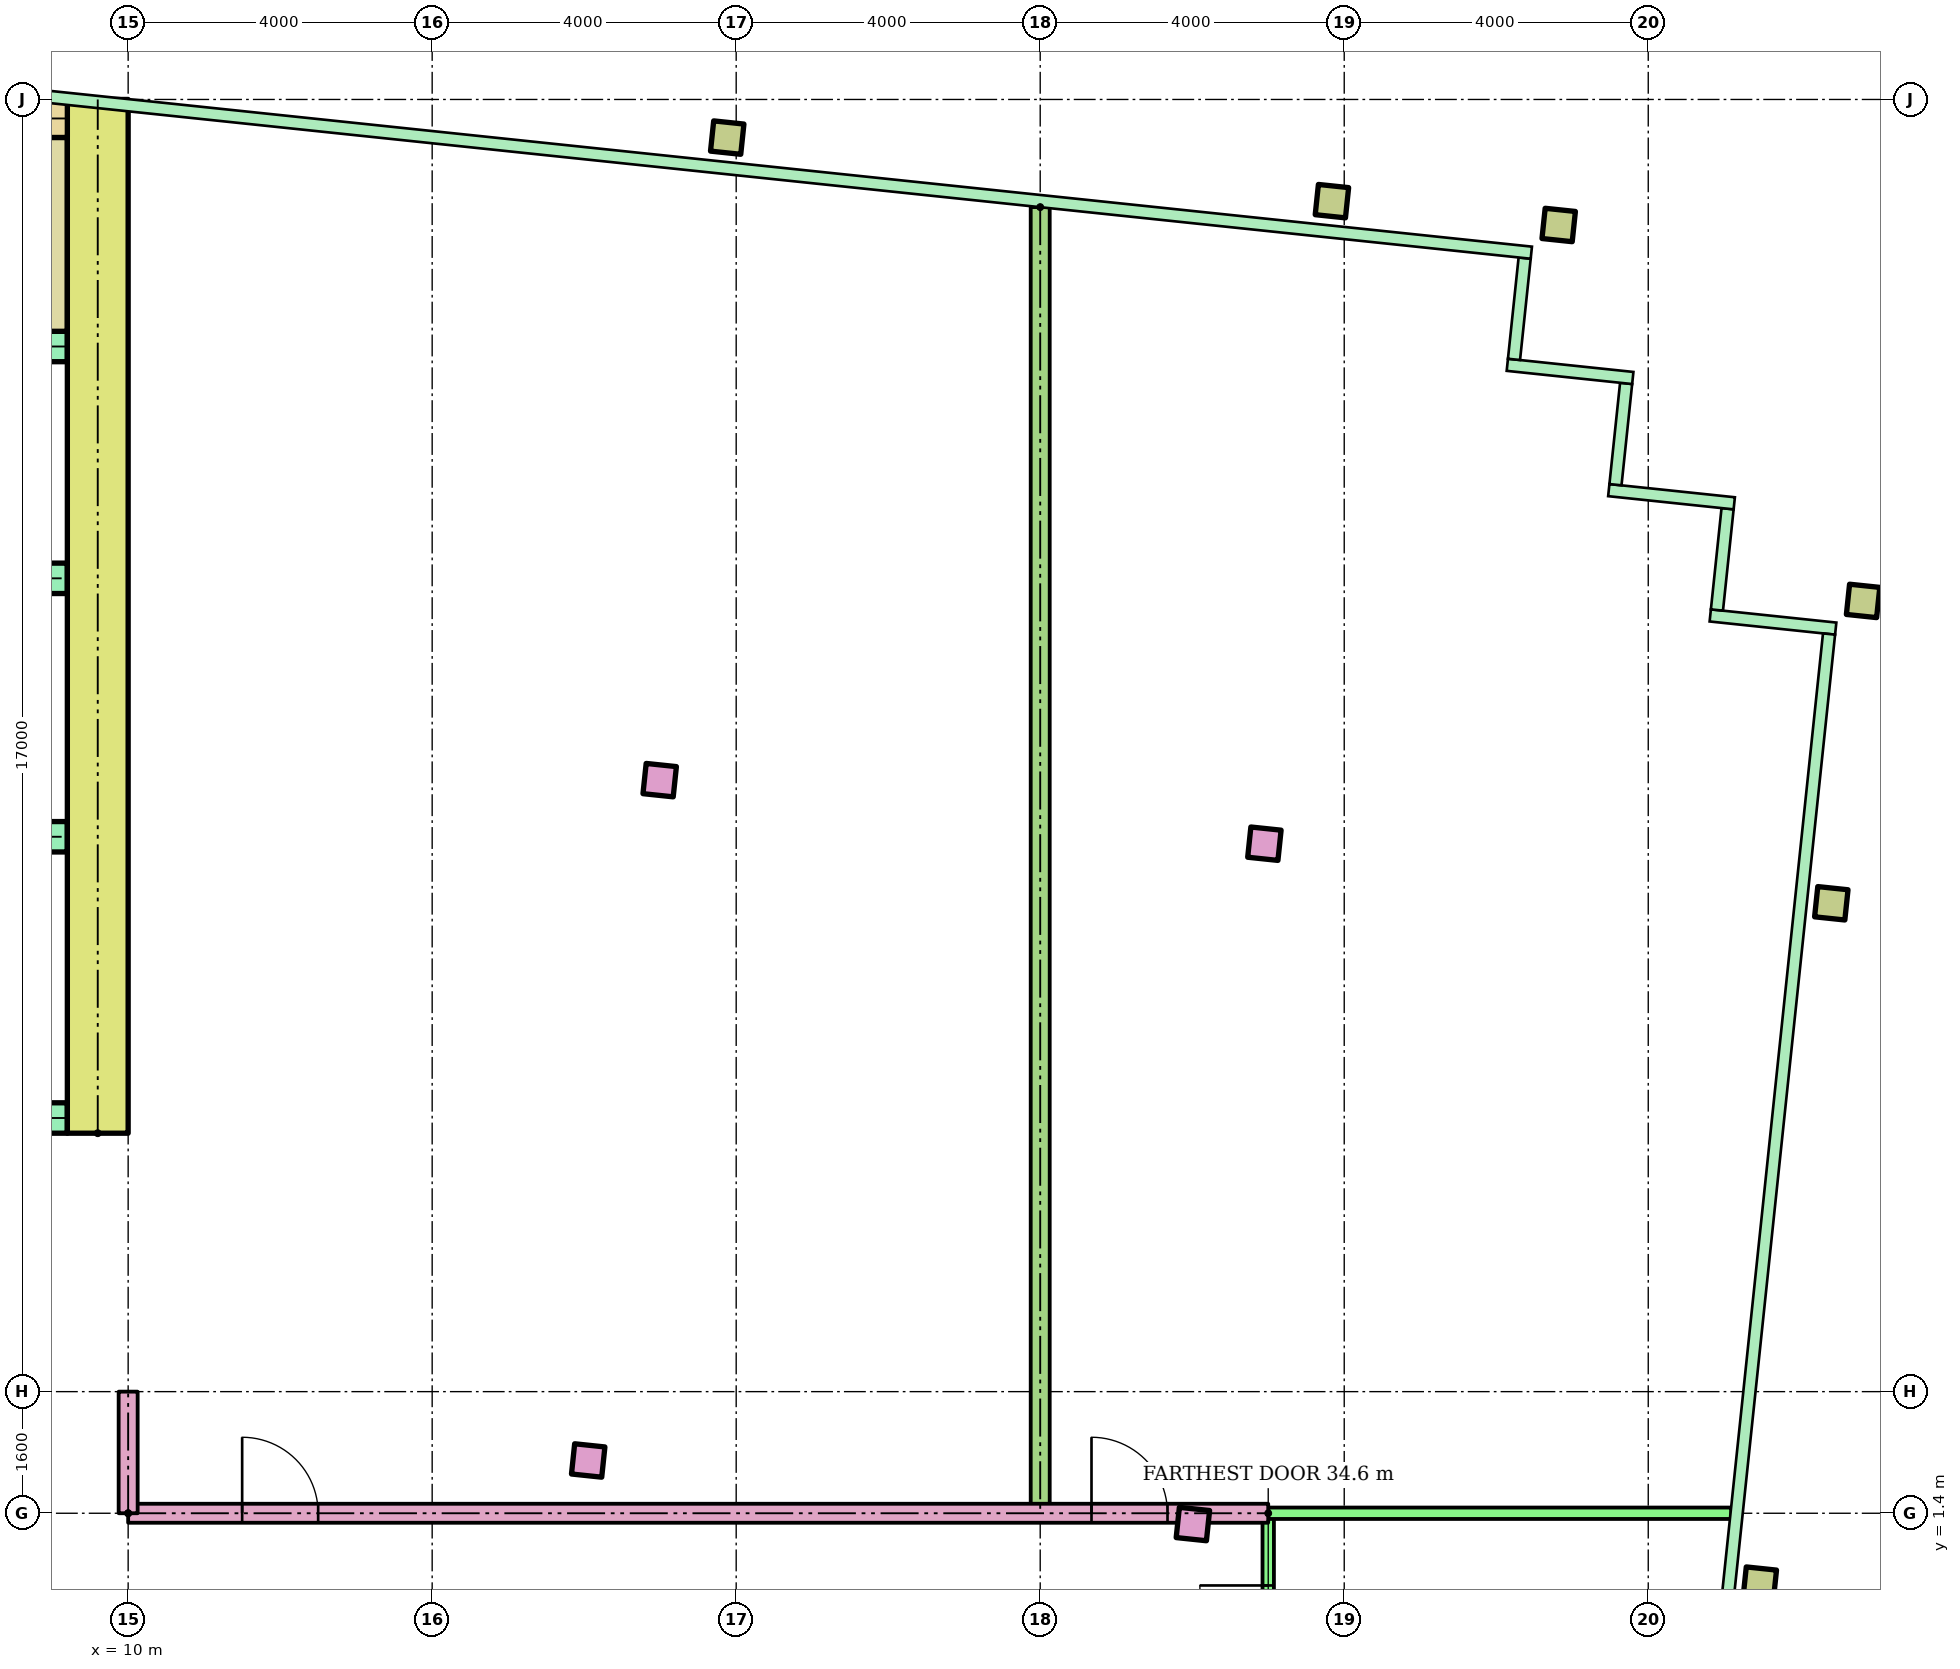
"""IFC4 building model, lengths in metres.
Left out: names, types, materials, properties, quantities, classifications, styles, units other than length and angle.
Written with IfcOpenShell. Run it as: python <this file> out.ifc"""

import sys

from ifc_helpers import new_model, si_unit, direction, frame, frame_2d, origin, origin_2d, place, context, subcontext, project, spatial, rectangle, hollow_rectangle, extrude, element, fill, save


model = new_model("IFC4")
c1 = context("Model", 3, precision=1e-05, world=origin(), true_north=direction((0.0, 1.0)))
c2 = subcontext(c1, "Body", "Model", "MODEL_VIEW")
j1 = project(units=[si_unit("LENGTHUNIT", "METRE"), si_unit("PLANEANGLEUNIT", "RADIAN")], contexts=[c1])
p1 = place(None, origin())
s1 = spatial("IfcSite", under=j1, at=p1, CompositionType="ELEMENT")
p2 = place(p1, origin())
s2 = spatial("IfcBuilding", under=s1, at=p2, CompositionType="ELEMENT")
p3 = place(p2, frame((0.0, 0.0, 291.5)))
s3 = spatial("IfcBuildingStorey", under=s2, at=p3, CompositionType="ELEMENT", Elevation=291.5)
for number, where, z_axis, x_axis in (
    (1, (16.053, 2.094, 0.0), (0.0, 0.0, 1.0), (0.995, -0.105, 0.0)),
    (2, (24.009, 1.258, 0.0), (0.0, 0.0, 1.0), (0.995, -0.105, 0.0)),
):
    element("IfcColumn", number, at=place(p3, frame(where, z_axis=z_axis, x_axis=x_axis)), inside=s3, PredefinedType="COLUMN", context=c2, shape_type="SweptSolid", body=[
        extrude(rectangle(XDim=0.4, YDim=0.4, at=origin_2d()), origin(), (0.0, 0.0, 1.0), 3.4),
    ])
p4 = place(p3, frame((31.468, 0.474, 0.0), z_axis=(0.0, 0.0, 1.0), x_axis=(0.994521895368, -0.104528463268, 0.0)))
e3 = element("IfcColumn", 3, at=p4, inside=s3, PredefinedType="COLUMN", context=c2, shape_type="SweptSolid", body=[
    extrude(hollow_rectangle(XDim=0.4, YDim=0.4, WallThickness=0.02, at=origin_2d()), origin(), (0.0, 0.0, 1.0), 3.4),
])
for number, where, z_axis, x_axis in (
    (4, (16.993, 11.045, 0.0), (0.0, 0.0, 1.0), (0.995, -0.105, 0.0)),
    (5, (24.95, 10.209, 0.0), (0.0, 0.0, 1.0), (0.995, -0.105, 0.0)),
):
    element("IfcColumn", number, at=place(p3, frame(where, z_axis=z_axis, x_axis=x_axis)), inside=s3, PredefinedType="COLUMN", context=c2, shape_type="SweptSolid", body=[
        extrude(rectangle(XDim=0.4, YDim=0.4, at=origin_2d()), origin(), (0.0, 0.0, 1.0), 3.4),
    ])
for number, where, z_axis, x_axis in (
    (6, (32.409, 9.425, 0.0), (0.0, 0.0, 1.0), (0.995, -0.105, 0.0)),
    (7, (32.827, 13.403, 0.0), (0.0, 0.0, 1.0), (0.995, -0.105, 0.0)),
    (8, (17.882, 19.498, 0.0), (0.0, 0.0, 1.0), (0.995, -0.105, 0.0)),
    (9, (25.838, 18.662, 0.0), (0.0, 0.0, 1.0), (0.995, -0.105, 0.0)),
    (10, (28.822, 18.349, 0.0), (0.0, 0.0, 1.0), (0.995, -0.105, 0.0)),
):
    element("IfcColumn", number, at=place(p3, frame(where, z_axis=z_axis, x_axis=x_axis)), inside=s3, PredefinedType="COLUMN", context=c2, shape_type="SweptSolid", body=[
        extrude(hollow_rectangle(XDim=0.4, YDim=0.4, WallThickness=0.02, at=origin_2d()), origin(), (0.0, 0.0, 1.0), 3.4),
    ])
p5 = place(p3, frame((9.6, 6.4, 0.0), z_axis=(0.0, 0.0, 1.0), x_axis=(0.0, 1.0, 0.0)))
e11 = element("IfcWall", 11, at=p5, inside=s3, PredefinedType="SHEAR", context=c2, shape_type="SweptSolid", body=[
    extrude(rectangle(XDim=13.6, YDim=0.8, at=frame_2d((6.8, 0.0))), origin(), (0.0, 0.0, 1.0), 3.12),
])
p6 = place(p3, frame((-9.2, 19.75, 0.0)))
e12 = element("IfcWall", 12, at=p6, inside=s3, PredefinedType="SHEAR", context=c2, shape_type="SweptSolid", body=[
    extrude(rectangle(XDim=18.4, YDim=0.5, at=frame_2d((9.2, 0.0))), origin(), (0.0, 0.0, 1.0), 3.12),
])
p7 = place(p3, frame((-9.2, 6.6, 0.0)))
e13 = element("IfcWall", 13, at=p7, inside=s3, PredefinedType="SHEAR", context=c2, shape_type="SweptSolid", body=[
    extrude(rectangle(XDim=18.4, YDim=0.4, at=frame_2d((9.2, 0.0))), origin(), (0.0, 0.0, 1.0), 3.12),
])
p8 = place(p7, frame((8.3, 0.0, 0.0)))
e14 = element("IfcOpeningElement", 14, at=p8, cuts=e13, PredefinedType="OPENING", context=c2, shape_type="SweptSolid", body=[
    extrude(rectangle(XDim=1.8, YDim=2.1, at=frame_2d((0.9, 1.05))), frame((0.0, 0.21, 0.0), z_axis=(0.0, -1.0, 0.0), x_axis=(1.0, 0.0, 0.0)), (0.0, 0.0, 1.0), 0.42),
])
p9 = place(p7, frame((3.8, 0.0, 0.0)))
e15 = element("IfcOpeningElement", 15, at=p9, cuts=e13, PredefinedType="OPENING", context=c2, shape_type="SweptSolid", body=[
    extrude(rectangle(XDim=1.8, YDim=2.1, at=frame_2d((0.9, 1.05))), frame((0.0, 0.21, 0.0), z_axis=(0.0, -1.0, 0.0), x_axis=(1.0, 0.0, 0.0)), (0.0, 0.0, 1.0), 0.42),
])
p10 = place(p7, frame((12.8, 0.0, 0.0)))
e16 = element("IfcOpeningElement", 16, at=p10, cuts=e13, PredefinedType="OPENING", context=c2, shape_type="SweptSolid", body=[
    extrude(rectangle(XDim=1.8, YDim=2.1, at=frame_2d((0.9, 1.05))), frame((0.0, 0.21, 0.0), z_axis=(0.0, -1.0, 0.0), x_axis=(1.0, 0.0, 0.0)), (0.0, 0.0, 1.0), 0.42),
])
p11 = place(p3, frame((1.2, 10.3, 0.0)))
e17 = element("IfcWall", 17, at=p11, inside=s3, PredefinedType="SHEAR", context=c2, shape_type="SweptSolid", body=[
    extrude(rectangle(XDim=8.0, YDim=0.4, at=frame_2d((4.0, 0.0))), origin(), (0.0, 0.0, 1.0), 3.12),
])
p12 = place(p11, frame((0.817, 0.0, 0.0)))
e18 = element("IfcOpeningElement", 18, at=p12, cuts=e17, PredefinedType="OPENING", context=c2, shape_type="SweptSolid", body=[
    extrude(rectangle(XDim=1.1, YDim=2.1, at=frame_2d((0.55, 1.05))), frame((0.0, 0.21, 0.0), z_axis=(0.0, -1.0, 0.0), x_axis=(1.0, 0.0, 0.0)), (0.0, 0.0, 1.0), 0.42),
])
p13 = place(p11, frame((3.55, 0.0, 0.0)))
e19 = element("IfcOpeningElement", 19, at=p13, cuts=e17, PredefinedType="OPENING", context=c2, shape_type="SweptSolid", body=[
    extrude(rectangle(XDim=1.1, YDim=2.1, at=frame_2d((0.55, 1.05))), frame((0.0, 0.21, 0.0), z_axis=(0.0, -1.0, 0.0), x_axis=(1.0, 0.0, 0.0)), (0.0, 0.0, 1.0), 0.42),
])
p14 = place(p11, frame((6.283, 0.0, 0.0)))
e20 = element("IfcOpeningElement", 20, at=p14, cuts=e17, PredefinedType="OPENING", context=c2, shape_type="SweptSolid", body=[
    extrude(rectangle(XDim=1.1, YDim=2.1, at=frame_2d((0.55, 1.05))), frame((0.0, 0.21, 0.0), z_axis=(0.0, -1.0, 0.0), x_axis=(1.0, 0.0, 0.0)), (0.0, 0.0, 1.0), 0.42),
])
p15 = place(p3, frame((1.2, 13.7, 0.0)))
e21 = element("IfcWall", 21, at=p15, inside=s3, PredefinedType="SHEAR", context=c2, shape_type="SweptSolid", body=[
    extrude(rectangle(XDim=8.0, YDim=0.4, at=frame_2d((4.0, 0.0))), origin(), (0.0, 0.0, 1.0), 3.12),
])
p16 = place(p3, frame((-9.2, 16.75, 0.0)))
e22 = element("IfcWall", 22, at=p16, inside=s3, PredefinedType="SHEAR", context=c2, shape_type="SweptSolid", body=[
    extrude(rectangle(XDim=18.4, YDim=0.4, at=frame_2d((9.2, 0.0))), origin(), (0.0, 0.0, 1.0), 3.12),
])
p17 = place(p16, frame((0.1, 0.0, 0.0)))
e23 = element("IfcOpeningElement", 23, at=p17, cuts=e22, PredefinedType="OPENING", context=c2, shape_type="SweptSolid", body=[
    extrude(rectangle(XDim=0.95, YDim=2.1, at=frame_2d((0.475, 1.05))), frame((0.0, 0.21, 0.0), z_axis=(0.0, -1.0, 0.0), x_axis=(1.0, 0.0, 0.0)), (0.0, 0.0, 1.0), 0.42),
])
p18 = place(p16, frame((6.1, 0.0, 0.0)))
e24 = element("IfcOpeningElement", 24, at=p18, cuts=e22, PredefinedType="OPENING", context=c2, shape_type="SweptSolid", body=[
    extrude(rectangle(XDim=0.95, YDim=2.1, at=frame_2d((0.475, 1.05))), frame((0.0, 0.21, 0.0), z_axis=(0.0, -1.0, 0.0), x_axis=(1.0, 0.0, 0.0)), (0.0, 0.0, 1.0), 0.42),
])
p19 = place(p16, frame((12.1, 0.0, 0.0)))
e25 = element("IfcOpeningElement", 25, at=p19, cuts=e22, PredefinedType="OPENING", context=c2, shape_type="SweptSolid", body=[
    extrude(rectangle(XDim=0.95, YDim=2.1, at=frame_2d((0.475, 1.05))), frame((0.0, 0.21, 0.0), z_axis=(0.0, -1.0, 0.0), x_axis=(1.0, 0.0, 0.0)), (0.0, 0.0, 1.0), 0.42),
])
p20 = place(p3, frame((8.75, 16.95, 0.0), z_axis=(0.0, 0.0, 1.0), x_axis=(0.0, 1.0, 0.0)))
e26 = element("IfcWall", 26, at=p20, inside=s3, PredefinedType="SHEAR", context=c2, shape_type="SweptSolid", body=[
    extrude(rectangle(XDim=2.55, YDim=0.9, at=frame_2d((1.275, 0.0))), origin(), (0.0, 0.0, 1.0), 3.12),
])
p21 = place(p3, frame((25.0, -1.4, 0.0), z_axis=(0.0, 0.0, 1.0), x_axis=(0.0, 1.0, 0.0)))
e27 = element("IfcWall", 27, at=p21, inside=s3, PredefinedType="PARTITIONING", context=c2, shape_type="SweptSolid", body=[
    extrude(rectangle(XDim=2.8, YDim=0.15, at=frame_2d((1.4, 0.0))), origin(), (0.0, 0.0, 1.0), 2.6),
])
p22 = place(p21, frame((0.95, 0.0, 0.0)))
e28 = element("IfcOpeningElement", 28, at=p22, cuts=e27, PredefinedType="OPENING", context=c2, shape_type="SweptSolid", body=[
    extrude(rectangle(XDim=0.9, YDim=2.1, at=frame_2d((0.45, 1.05))), frame((0.0, 0.085, 0.0), z_axis=(0.0, -1.0, 0.0), x_axis=(1.0, 0.0, 0.0)), (0.0, 0.0, 1.0), 0.17),
])
p23 = place(p3, frame((10.0, 1.4, 0.0)))
e29 = element("IfcWall", 29, at=p23, inside=s3, PredefinedType="PARTITIONING", context=c2, shape_type="SweptSolid", body=[
    extrude(rectangle(XDim=15.0, YDim=0.25, at=frame_2d((7.5, 0.0))), origin(), (0.0, 0.0, 1.0), 2.6),
])
p24 = place(p23, frame((1.5, 0.0, 0.0)))
e30 = element("IfcOpeningElement", 30, at=p24, cuts=e29, PredefinedType="OPENING", context=c2, shape_type="SweptSolid", body=[
    extrude(rectangle(XDim=1.0, YDim=2.1, at=frame_2d((0.5, 1.05))), frame((0.0, 0.135, 0.0), z_axis=(0.0, -1.0, 0.0), x_axis=(1.0, 0.0, 0.0)), (0.0, 0.0, 1.0), 0.27),
])
p25 = place(p23, frame((12.675, 0.0, 0.0)))
e31 = element("IfcOpeningElement", 31, at=p25, cuts=e29, PredefinedType="OPENING", context=c2, shape_type="SweptSolid", body=[
    extrude(rectangle(XDim=1.0, YDim=2.1, at=frame_2d((0.5, 1.05))), frame((0.0, 0.135, 0.0), z_axis=(0.0, -1.0, 0.0), x_axis=(1.0, 0.0, 0.0)), (0.0, 0.0, 1.0), 0.27),
])
p26 = place(p3, frame((25.0, 1.4, 0.0)))
e32 = element("IfcWall", 32, at=p26, inside=s3, PredefinedType="PARTITIONING", context=c2, shape_type="SweptSolid", body=[
    extrude(rectangle(XDim=6.093, YDim=0.15, at=frame_2d((3.046, 0.0))), origin(), (0.0, 0.0, 1.0), 2.6),
])
p27 = place(p3, frame((22.0, 18.584, 0.0), z_axis=(0.0, 0.0, 1.0), x_axis=(0.0, -1.0, 0.0)))
e33 = element("IfcWall", 33, at=p27, inside=s3, PredefinedType="PARTITIONING", context=c2, shape_type="SweptSolid", body=[
    extrude(rectangle(XDim=17.184, YDim=0.25, at=frame_2d((8.592, 0.0))), origin(), (0.0, 0.0, 1.0), 2.6),
])
p28 = place(p3, frame((10.0, 1.4, 0.0), z_axis=(0.0, 0.0, 1.0), x_axis=(0.0, 1.0, 0.0)))
e34 = element("IfcWall", 34, at=p28, inside=s3, PredefinedType="PARTITIONING", context=c2, shape_type="SweptSolid", body=[
    extrude(rectangle(XDim=1.6, YDim=0.25, at=frame_2d((0.8, 0.0))), origin(), (0.0, 0.0, 1.0), 2.6),
])
p29 = place(p22, origin())
e35 = element("IfcDoor", 35, at=p29, inside=s3, OperationType="SINGLE_SWING_RIGHT", PredefinedType="DOOR", context=c2, shape_type="SweptSolid", body=[
    extrude(rectangle(XDim=0.9, YDim=2.1, at=frame_2d((0.45, 1.05))), frame((0.0, 0.025, 0.0), z_axis=(0.0, -1.0, 0.0), x_axis=(1.0, 0.0, 0.0)), (0.0, 0.0, 1.0), 0.05),
])
fill(e28, e35)
p30 = place(p24, origin())
e36 = element("IfcDoor", 36, at=p30, inside=s3, OperationType="SINGLE_SWING_LEFT", PredefinedType="DOOR", context=c2, shape_type="SweptSolid", body=[
    extrude(rectangle(XDim=1.0, YDim=2.1, at=frame_2d((0.5, 1.05))), frame((0.0, 0.025, 0.0), z_axis=(0.0, -1.0, 0.0), x_axis=(1.0, 0.0, 0.0)), (0.0, 0.0, 1.0), 0.05),
])
fill(e30, e36)
p31 = place(p25, origin())
e37 = element("IfcDoor", 37, at=p31, inside=s3, OperationType="SINGLE_SWING_LEFT", PredefinedType="DOOR", context=c2, shape_type="SweptSolid", body=[
    extrude(rectangle(XDim=1.0, YDim=2.1, at=frame_2d((0.5, 1.05))), frame((0.0, 0.025, 0.0), z_axis=(0.0, -1.0, 0.0), x_axis=(1.0, 0.0, 0.0)), (0.0, 0.0, 1.0), 0.05),
])
fill(e31, e37)
save(model, sys.argv[1])
